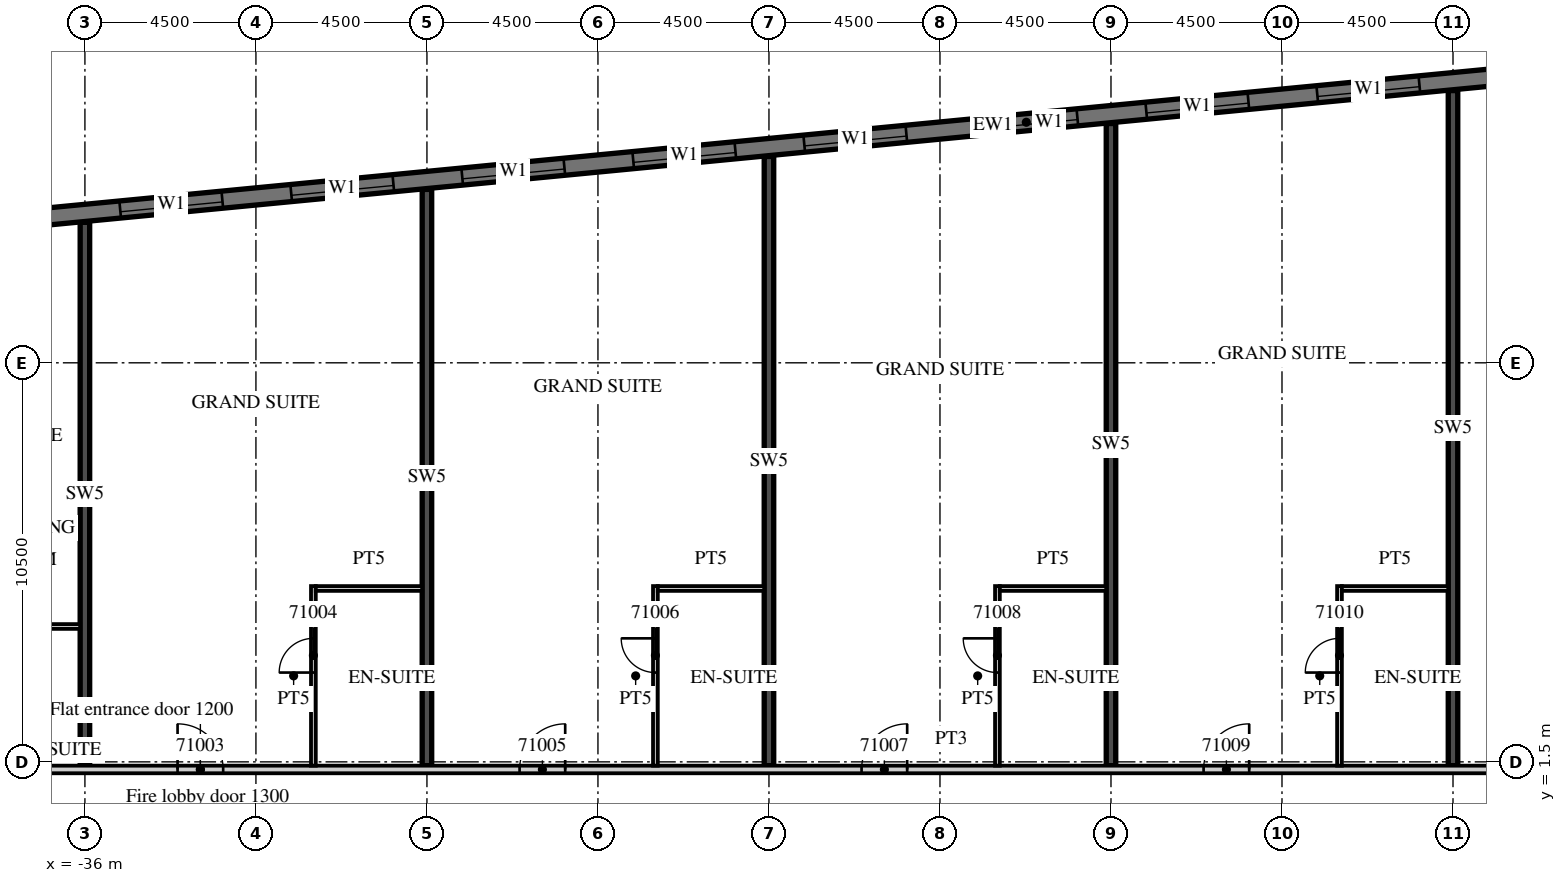
"""IFC4 building model, lengths in metres.
Left out: names, types, materials, properties, quantities, classifications, styles, units other than length and angle.
Written with IfcOpenShell. Run it as: python <this file> out.ifc"""

import sys

from ifc_helpers import new_model, si_unit, direction, frame, frame_2d, origin, place, context, subcontext, project, spatial, rectangle, extrude, element, fill, save


model = new_model("IFC4")
c1 = context("Model", 3, precision=1e-05, world=origin(), true_north=direction((0.0, 1.0)))
c2 = subcontext(c1, "Body", "Model", "MODEL_VIEW")
j1 = project(units=[si_unit("LENGTHUNIT", "METRE"), si_unit("PLANEANGLEUNIT", "RADIAN")], contexts=[c1])
p1 = place(None, origin())
s1 = spatial("IfcSite", under=j1, at=p1, CompositionType="ELEMENT")
p2 = place(p1, origin())
s2 = spatial("IfcBuilding", under=s1, at=p2, CompositionType="ELEMENT")
p3 = place(p2, frame((0.0, 0.0, 285.0)))
s3 = spatial("IfcBuildingStorey", under=s2, at=p3, CompositionType="ELEMENT", Elevation=285.0)
p4 = place(p3, frame((-36.0, 1.4, 0.0), z_axis=(0.0, 0.0, 1.0), x_axis=(0.0, 1.0, 0.0)))
e1 = element("IfcWall", 1, at=p4, inside=s3, PredefinedType="SHEAR", context=c2, shape_type="SweptSolid", body=[
    extrude(rectangle(XDim=14.296, YDim=0.25, at=frame_2d((7.148, 0.0))), origin(), (0.0, 0.0, 1.0), 3.3),
])
p5 = place(p3, frame((-27.0, 1.4, 0.0), z_axis=(0.0, 0.0, 1.0), x_axis=(0.0, 1.0, 0.0)))
e2 = element("IfcWall", 2, at=p5, inside=s3, PredefinedType="SHEAR", context=c2, shape_type="SweptSolid", body=[
    extrude(rectangle(XDim=15.163, YDim=0.25, at=frame_2d((7.582, 0.0))), origin(), (0.0, 0.0, 1.0), 3.3),
])
p6 = place(p3, frame((-18.0, 1.4, 0.0), z_axis=(0.0, 0.0, 1.0), x_axis=(0.0, 1.0, 0.0)))
e3 = element("IfcWall", 3, at=p6, inside=s3, PredefinedType="SHEAR", context=c2, shape_type="SweptSolid", body=[
    extrude(rectangle(XDim=16.03, YDim=0.25, at=frame_2d((8.015, 0.0))), origin(), (0.0, 0.0, 1.0), 3.3),
])
p7 = place(p3, frame((-9.0, 1.4, 0.0), z_axis=(0.0, 0.0, 1.0), x_axis=(0.0, 1.0, 0.0)))
e4 = element("IfcWall", 4, at=p7, inside=s3, PredefinedType="SHEAR", context=c2, shape_type="SweptSolid", body=[
    extrude(rectangle(XDim=16.896, YDim=0.25, at=frame_2d((8.448, 0.0))), origin(), (0.0, 0.0, 1.0), 3.3),
])
p8 = place(p3, frame((0.0, 1.4, 0.0), z_axis=(0.0, 0.0, 1.0), x_axis=(0.0, 1.0, 0.0)))
e5 = element("IfcWall", 5, at=p8, inside=s3, PredefinedType="SHEAR", context=c2, shape_type="SweptSolid", body=[
    extrude(rectangle(XDim=17.763, YDim=0.25, at=frame_2d((8.881, 0.0))), origin(), (0.0, 0.0, 1.0), 3.3),
])
p9 = place(p3, frame((13.521, 20.713, 0.0), z_axis=(0.0, 0.0, 1.0), x_axis=(-0.995396277313, -0.095844932638, 0.0)))
e6 = element("IfcWall", 6, at=p9, inside=s3, PredefinedType="SOLIDWALL", context=c2, shape_type="SweptSolid", body=[
    extrude(rectangle(XDim=51.495, YDim=0.45, at=frame_2d((25.748, 0.0))), origin(), (0.0, 0.0, 1.0), 3.02),
])
p10 = place(p9, frame((0.91, 0.0, 0.45)))
e7 = element("IfcOpeningElement", 7, at=p10, cuts=e6, PredefinedType="OPENING", context=c2, shape_type="SweptSolid", body=[
    extrude(rectangle(XDim=2.7, YDim=2.25, at=frame_2d((1.35, 1.125))), frame((0.0, 0.235, 0.0), z_axis=(0.0, -1.0, 0.0), x_axis=(1.0, 0.0, 0.0)), (0.0, 0.0, 1.0), 0.47),
])
p11 = place(p9, frame((5.431, 0.0, 0.45)))
e8 = element("IfcOpeningElement", 8, at=p11, cuts=e6, PredefinedType="OPENING", context=c2, shape_type="SweptSolid", body=[
    extrude(rectangle(XDim=2.7, YDim=2.25, at=frame_2d((1.35, 1.125))), frame((0.0, 0.235, 0.0), z_axis=(0.0, -1.0, 0.0), x_axis=(1.0, 0.0, 0.0)), (0.0, 0.0, 1.0), 0.47),
])
p12 = place(p9, frame((9.952, 0.0, 0.45)))
e9 = element("IfcOpeningElement", 9, at=p12, cuts=e6, PredefinedType="OPENING", context=c2, shape_type="SweptSolid", body=[
    extrude(rectangle(XDim=2.7, YDim=2.25, at=frame_2d((1.35, 1.125))), frame((0.0, 0.235, 0.0), z_axis=(0.0, -1.0, 0.0), x_axis=(1.0, 0.0, 0.0)), (0.0, 0.0, 1.0), 0.47),
])
p13 = place(p9, frame((14.473, 0.0, 0.45)))
e10 = element("IfcOpeningElement", 10, at=p13, cuts=e6, PredefinedType="OPENING", context=c2, shape_type="SweptSolid", body=[
    extrude(rectangle(XDim=2.7, YDim=2.25, at=frame_2d((1.35, 1.125))), frame((0.0, 0.235, 0.0), z_axis=(0.0, -1.0, 0.0), x_axis=(1.0, 0.0, 0.0)), (0.0, 0.0, 1.0), 0.47),
])
p14 = place(p9, frame((18.994, 0.0, 0.45)))
e11 = element("IfcOpeningElement", 11, at=p14, cuts=e6, PredefinedType="OPENING", context=c2, shape_type="SweptSolid", body=[
    extrude(rectangle(XDim=2.7, YDim=2.25, at=frame_2d((1.35, 1.125))), frame((0.0, 0.235, 0.0), z_axis=(0.0, -1.0, 0.0), x_axis=(1.0, 0.0, 0.0)), (0.0, 0.0, 1.0), 0.47),
])
p15 = place(p9, frame((23.514, 0.0, 0.45)))
e12 = element("IfcOpeningElement", 12, at=p15, cuts=e6, PredefinedType="OPENING", context=c2, shape_type="SweptSolid", body=[
    extrude(rectangle(XDim=2.7, YDim=2.25, at=frame_2d((1.35, 1.125))), frame((0.0, 0.235, 0.0), z_axis=(0.0, -1.0, 0.0), x_axis=(1.0, 0.0, 0.0)), (0.0, 0.0, 1.0), 0.47),
])
p16 = place(p9, frame((28.035, 0.0, 0.45)))
e13 = element("IfcOpeningElement", 13, at=p16, cuts=e6, PredefinedType="OPENING", context=c2, shape_type="SweptSolid", body=[
    extrude(rectangle(XDim=2.7, YDim=2.25, at=frame_2d((1.35, 1.125))), frame((0.0, 0.235, 0.0), z_axis=(0.0, -1.0, 0.0), x_axis=(1.0, 0.0, 0.0)), (0.0, 0.0, 1.0), 0.47),
])
p17 = place(p9, frame((32.556, 0.0, 0.45)))
e14 = element("IfcOpeningElement", 14, at=p17, cuts=e6, PredefinedType="OPENING", context=c2, shape_type="SweptSolid", body=[
    extrude(rectangle(XDim=2.7, YDim=2.25, at=frame_2d((1.35, 1.125))), frame((0.0, 0.235, 0.0), z_axis=(0.0, -1.0, 0.0), x_axis=(1.0, 0.0, 0.0)), (0.0, 0.0, 1.0), 0.47),
])
p18 = place(p9, frame((37.077, 0.0, 0.45)))
e15 = element("IfcOpeningElement", 15, at=p18, cuts=e6, PredefinedType="OPENING", context=c2, shape_type="SweptSolid", body=[
    extrude(rectangle(XDim=2.7, YDim=2.25, at=frame_2d((1.35, 1.125))), frame((0.0, 0.235, 0.0), z_axis=(0.0, -1.0, 0.0), x_axis=(1.0, 0.0, 0.0)), (0.0, 0.0, 1.0), 0.47),
])
p19 = place(p9, frame((41.598, 0.0, 0.45)))
e16 = element("IfcOpeningElement", 16, at=p19, cuts=e6, PredefinedType="OPENING", context=c2, shape_type="SweptSolid", body=[
    extrude(rectangle(XDim=2.7, YDim=2.25, at=frame_2d((1.35, 1.125))), frame((0.0, 0.235, 0.0), z_axis=(0.0, -1.0, 0.0), x_axis=(1.0, 0.0, 0.0)), (0.0, 0.0, 1.0), 0.47),
])
p20 = place(p9, frame((46.118, 0.0, 0.45)))
e17 = element("IfcOpeningElement", 17, at=p20, cuts=e6, PredefinedType="OPENING", context=c2, shape_type="SweptSolid", body=[
    extrude(rectangle(XDim=2.7, YDim=2.25, at=frame_2d((1.35, 1.125))), frame((0.0, 0.235, 0.0), z_axis=(0.0, -1.0, 0.0), x_axis=(1.0, 0.0, 0.0)), (0.0, 0.0, 1.0), 0.47),
])
p21 = place(p3, frame((-39.909, 1.3, 0.0), z_axis=(0.0, 0.0, 1.0), x_axis=(1.0, 0.0, 0.0)))
e18 = element("IfcWall", 18, at=p21, inside=s3, PredefinedType="PARTITIONING", context=c2, shape_type="SweptSolid", body=[
    extrude(rectangle(XDim=53.409, YDim=0.2, at=frame_2d((26.705, 0.0))), origin(), (0.0, 0.0, 1.0), 3.02),
])
p22 = place(p21, frame((0.15, 0.0, 0.0)))
e19 = element("IfcOpeningElement", 19, at=p22, cuts=e18, PredefinedType="OPENING", context=c2, shape_type="SweptSolid", body=[
    extrude(rectangle(XDim=0.9, YDim=2.1, at=frame_2d((0.45, 1.05))), frame((0.0, 0.11, 0.0), z_axis=(0.0, -1.0, 0.0), x_axis=(1.0, 0.0, 0.0)), (0.0, 0.0, 1.0), 0.22),
])
p23 = place(p21, frame((6.347, 0.0, 0.0)))
e20 = element("IfcOpeningElement", 20, at=p23, cuts=e18, PredefinedType="OPENING", context=c2, shape_type="SweptSolid", body=[
    extrude(rectangle(XDim=1.2, YDim=2.1, at=frame_2d((0.6, 1.05))), frame((0.0, 0.11, 0.0), z_axis=(0.0, -1.0, 0.0), x_axis=(1.0, 0.0, 0.0)), (0.0, 0.0, 1.0), 0.22),
])
p24 = place(p21, frame((15.347, 0.0, 0.0)))
e21 = element("IfcOpeningElement", 21, at=p24, cuts=e18, PredefinedType="OPENING", context=c2, shape_type="SweptSolid", body=[
    extrude(rectangle(XDim=1.2, YDim=2.1, at=frame_2d((0.6, 1.05))), frame((0.0, 0.11, 0.0), z_axis=(0.0, -1.0, 0.0), x_axis=(1.0, 0.0, 0.0)), (0.0, 0.0, 1.0), 0.22),
])
p25 = place(p21, frame((24.346, 0.0, 0.0)))
e22 = element("IfcOpeningElement", 22, at=p25, cuts=e18, PredefinedType="OPENING", context=c2, shape_type="SweptSolid", body=[
    extrude(rectangle(XDim=1.2, YDim=2.1, at=frame_2d((0.6, 1.05))), frame((0.0, 0.11, 0.0), z_axis=(0.0, -1.0, 0.0), x_axis=(1.0, 0.0, 0.0)), (0.0, 0.0, 1.0), 0.22),
])
p26 = place(p21, frame((33.346, 0.0, 0.0)))
e23 = element("IfcOpeningElement", 23, at=p26, cuts=e18, PredefinedType="OPENING", context=c2, shape_type="SweptSolid", body=[
    extrude(rectangle(XDim=1.2, YDim=2.1, at=frame_2d((0.6, 1.05))), frame((0.0, 0.11, 0.0), z_axis=(0.0, -1.0, 0.0), x_axis=(1.0, 0.0, 0.0)), (0.0, 0.0, 1.0), 0.22),
])
p27 = place(p21, frame((42.346, 0.0, 0.0)))
e24 = element("IfcOpeningElement", 24, at=p27, cuts=e18, PredefinedType="OPENING", context=c2, shape_type="SweptSolid", body=[
    extrude(rectangle(XDim=1.2, YDim=2.1, at=frame_2d((0.6, 1.05))), frame((0.0, 0.11, 0.0), z_axis=(0.0, -1.0, 0.0), x_axis=(1.0, 0.0, 0.0)), (0.0, 0.0, 1.0), 0.22),
])
p28 = place(p21, frame((51.834, 0.0, 0.0)))
e25 = element("IfcOpeningElement", 25, at=p28, cuts=e18, PredefinedType="OPENING", context=c2, shape_type="SweptSolid", body=[
    extrude(rectangle(XDim=1.0, YDim=2.1, at=frame_2d((0.5, 1.05))), frame((0.0, 0.11, 0.0), z_axis=(0.0, -1.0, 0.0), x_axis=(1.0, 0.0, 0.0)), (0.0, 0.0, 1.0), 0.22),
])
p29 = place(p3, frame((-38.878, 5.062, 0.0), z_axis=(0.0, 0.0, 1.0), x_axis=(1.0, 0.0, 0.0)))
e26 = element("IfcWall", 26, at=p29, inside=s3, PredefinedType="PARTITIONING", context=c2, shape_type="SweptSolid", body=[
    extrude(rectangle(XDim=2.753, YDim=0.125, at=frame_2d((1.376, 0.0))), origin(), (0.0, 0.0, 1.0), 3.02),
])
p30 = place(p3, frame((-29.988, 1.4, 0.0), z_axis=(0.0, 0.0, 1.0), x_axis=(0.0, 1.0, 0.0)))
e27 = element("IfcWall", 27, at=p30, inside=s3, PredefinedType="PARTITIONING", context=c2, shape_type="SweptSolid", body=[
    extrude(rectangle(XDim=4.725, YDim=0.125, at=frame_2d((2.363, 0.0))), origin(), (0.0, 0.0, 1.0), 3.02),
])
p31 = place(p30, frame((2.45, 0.0, 0.0)))
e28 = element("IfcOpeningElement", 28, at=p31, cuts=e27, PredefinedType="OPENING", context=c2, shape_type="SweptSolid", body=[
    extrude(rectangle(XDim=0.9, YDim=2.1, at=frame_2d((0.45, 1.05))), frame((0.0, 0.073, 0.0), z_axis=(0.0, -1.0, 0.0), x_axis=(1.0, 0.0, 0.0)), (0.0, 0.0, 1.0), 0.145),
])
p32 = place(p3, frame((-29.925, 6.062, 0.0), z_axis=(0.0, 0.0, 1.0), x_axis=(1.0, 0.0, 0.0)))
e29 = element("IfcWall", 29, at=p32, inside=s3, PredefinedType="PARTITIONING", context=c2, shape_type="SweptSolid", body=[
    extrude(rectangle(XDim=2.8, YDim=0.125, at=frame_2d((1.4, 0.0))), origin(), (0.0, 0.0, 1.0), 3.02),
])
p33 = place(p3, frame((-20.988, 1.4, 0.0), z_axis=(0.0, 0.0, 1.0), x_axis=(0.0, 1.0, 0.0)))
e30 = element("IfcWall", 30, at=p33, inside=s3, PredefinedType="PARTITIONING", context=c2, shape_type="SweptSolid", body=[
    extrude(rectangle(XDim=4.725, YDim=0.125, at=frame_2d((2.363, 0.0))), origin(), (0.0, 0.0, 1.0), 3.02),
])
p34 = place(p33, frame((2.45, 0.0, 0.0)))
e31 = element("IfcOpeningElement", 31, at=p34, cuts=e30, PredefinedType="OPENING", context=c2, shape_type="SweptSolid", body=[
    extrude(rectangle(XDim=0.9, YDim=2.1, at=frame_2d((0.45, 1.05))), frame((0.0, 0.073, 0.0), z_axis=(0.0, -1.0, 0.0), x_axis=(1.0, 0.0, 0.0)), (0.0, 0.0, 1.0), 0.145),
])
p35 = place(p3, frame((-20.925, 6.062, 0.0), z_axis=(0.0, 0.0, 1.0), x_axis=(1.0, 0.0, 0.0)))
e32 = element("IfcWall", 32, at=p35, inside=s3, PredefinedType="PARTITIONING", context=c2, shape_type="SweptSolid", body=[
    extrude(rectangle(XDim=2.8, YDim=0.125, at=frame_2d((1.4, 0.0))), origin(), (0.0, 0.0, 1.0), 3.02),
])
p36 = place(p3, frame((-11.988, 1.4, 0.0), z_axis=(0.0, 0.0, 1.0), x_axis=(0.0, 1.0, 0.0)))
e33 = element("IfcWall", 33, at=p36, inside=s3, PredefinedType="PARTITIONING", context=c2, shape_type="SweptSolid", body=[
    extrude(rectangle(XDim=4.725, YDim=0.125, at=frame_2d((2.363, 0.0))), origin(), (0.0, 0.0, 1.0), 3.02),
])
p37 = place(p36, frame((2.45, 0.0, 0.0)))
e34 = element("IfcOpeningElement", 34, at=p37, cuts=e33, PredefinedType="OPENING", context=c2, shape_type="SweptSolid", body=[
    extrude(rectangle(XDim=0.9, YDim=2.1, at=frame_2d((0.45, 1.05))), frame((0.0, 0.073, 0.0), z_axis=(0.0, -1.0, 0.0), x_axis=(1.0, 0.0, 0.0)), (0.0, 0.0, 1.0), 0.145),
])
p38 = place(p3, frame((-11.925, 6.062, 0.0), z_axis=(0.0, 0.0, 1.0), x_axis=(1.0, 0.0, 0.0)))
e35 = element("IfcWall", 35, at=p38, inside=s3, PredefinedType="PARTITIONING", context=c2, shape_type="SweptSolid", body=[
    extrude(rectangle(XDim=2.8, YDim=0.125, at=frame_2d((1.4, 0.0))), origin(), (0.0, 0.0, 1.0), 3.02),
])
p39 = place(p3, frame((-2.987, 1.4, 0.0), z_axis=(0.0, 0.0, 1.0), x_axis=(0.0, 1.0, 0.0)))
e36 = element("IfcWall", 36, at=p39, inside=s3, PredefinedType="PARTITIONING", context=c2, shape_type="SweptSolid", body=[
    extrude(rectangle(XDim=4.725, YDim=0.125, at=frame_2d((2.363, 0.0))), origin(), (0.0, 0.0, 1.0), 3.02),
])
p40 = place(p39, frame((2.45, 0.0, 0.0)))
e37 = element("IfcOpeningElement", 37, at=p40, cuts=e36, PredefinedType="OPENING", context=c2, shape_type="SweptSolid", body=[
    extrude(rectangle(XDim=0.9, YDim=2.1, at=frame_2d((0.45, 1.05))), frame((0.0, 0.073, 0.0), z_axis=(0.0, -1.0, 0.0), x_axis=(1.0, 0.0, 0.0)), (0.0, 0.0, 1.0), 0.145),
])
p41 = place(p3, frame((-2.925, 6.062, 0.0), z_axis=(0.0, 0.0, 1.0), x_axis=(1.0, 0.0, 0.0)))
e38 = element("IfcWall", 38, at=p41, inside=s3, PredefinedType="PARTITIONING", context=c2, shape_type="SweptSolid", body=[
    extrude(rectangle(XDim=2.8, YDim=0.125, at=frame_2d((1.4, 0.0))), origin(), (0.0, 0.0, 1.0), 3.02),
])
p42 = place(p13, origin())
e39 = element("IfcWindow", 39, at=p42, inside=s3, PartitioningType="SINGLE_PANEL", PredefinedType="WINDOW", context=c2, shape_type="SweptSolid", body=[
    extrude(rectangle(XDim=2.7, YDim=2.25, at=frame_2d((1.35, 1.125))), frame((0.0, 0.09, 0.0), z_axis=(0.0, -1.0, 0.0), x_axis=(1.0, 0.0, 0.0)), (0.0, 0.0, 1.0), 0.06),
])
fill(e10, e39)
p43 = place(p14, origin())
e40 = element("IfcWindow", 40, at=p43, inside=s3, PartitioningType="SINGLE_PANEL", PredefinedType="WINDOW", context=c2, shape_type="SweptSolid", body=[
    extrude(rectangle(XDim=2.7, YDim=2.25, at=frame_2d((1.35, 1.125))), frame((0.0, 0.09, 0.0), z_axis=(0.0, -1.0, 0.0), x_axis=(1.0, 0.0, 0.0)), (0.0, 0.0, 1.0), 0.06),
])
fill(e11, e40)
p44 = place(p15, origin())
e41 = element("IfcWindow", 41, at=p44, inside=s3, PartitioningType="SINGLE_PANEL", PredefinedType="WINDOW", context=c2, shape_type="SweptSolid", body=[
    extrude(rectangle(XDim=2.7, YDim=2.25, at=frame_2d((1.35, 1.125))), frame((0.0, 0.09, 0.0), z_axis=(0.0, -1.0, 0.0), x_axis=(1.0, 0.0, 0.0)), (0.0, 0.0, 1.0), 0.06),
])
fill(e12, e41)
p45 = place(p16, origin())
e42 = element("IfcWindow", 42, at=p45, inside=s3, PartitioningType="SINGLE_PANEL", PredefinedType="WINDOW", context=c2, shape_type="SweptSolid", body=[
    extrude(rectangle(XDim=2.7, YDim=2.25, at=frame_2d((1.35, 1.125))), frame((0.0, 0.09, 0.0), z_axis=(0.0, -1.0, 0.0), x_axis=(1.0, 0.0, 0.0)), (0.0, 0.0, 1.0), 0.06),
])
fill(e13, e42)
p46 = place(p17, origin())
e43 = element("IfcWindow", 43, at=p46, inside=s3, PartitioningType="SINGLE_PANEL", PredefinedType="WINDOW", context=c2, shape_type="SweptSolid", body=[
    extrude(rectangle(XDim=2.7, YDim=2.25, at=frame_2d((1.35, 1.125))), frame((0.0, 0.09, 0.0), z_axis=(0.0, -1.0, 0.0), x_axis=(1.0, 0.0, 0.0)), (0.0, 0.0, 1.0), 0.06),
])
fill(e14, e43)
p47 = place(p18, origin())
e44 = element("IfcWindow", 44, at=p47, inside=s3, PartitioningType="SINGLE_PANEL", PredefinedType="WINDOW", context=c2, shape_type="SweptSolid", body=[
    extrude(rectangle(XDim=2.7, YDim=2.25, at=frame_2d((1.35, 1.125))), frame((0.0, 0.09, 0.0), z_axis=(0.0, -1.0, 0.0), x_axis=(1.0, 0.0, 0.0)), (0.0, 0.0, 1.0), 0.06),
])
fill(e15, e44)
p48 = place(p19, origin())
e45 = element("IfcWindow", 45, at=p48, inside=s3, PartitioningType="SINGLE_PANEL", PredefinedType="WINDOW", context=c2, shape_type="SweptSolid", body=[
    extrude(rectangle(XDim=2.7, YDim=2.25, at=frame_2d((1.35, 1.125))), frame((0.0, 0.09, 0.0), z_axis=(0.0, -1.0, 0.0), x_axis=(1.0, 0.0, 0.0)), (0.0, 0.0, 1.0), 0.06),
])
fill(e16, e45)
p49 = place(p20, origin())
e46 = element("IfcWindow", 46, at=p49, inside=s3, PartitioningType="SINGLE_PANEL", PredefinedType="WINDOW", context=c2, shape_type="SweptSolid", body=[
    extrude(rectangle(XDim=2.7, YDim=2.25, at=frame_2d((1.35, 1.125))), frame((0.0, 0.09, 0.0), z_axis=(0.0, -1.0, 0.0), x_axis=(1.0, 0.0, 0.0)), (0.0, 0.0, 1.0), 0.06),
])
fill(e17, e46)
p50 = place(p23, origin())
e47 = element("IfcDoor", 47, at=p50, inside=s3, OperationType="SINGLE_SWING_LEFT", PredefinedType="DOOR", context=c2, shape_type="SweptSolid", body=[
    extrude(rectangle(XDim=1.2, YDim=2.1, at=frame_2d((0.6, 1.05))), frame((0.0, 0.025, 0.0), z_axis=(0.0, -1.0, 0.0), x_axis=(1.0, 0.0, 0.0)), (0.0, 0.0, 1.0), 0.05),
])
fill(e20, e47)
p51 = place(p31, origin())
e48 = element("IfcDoor", 48, at=p51, inside=s3, OperationType="SINGLE_SWING_LEFT", PredefinedType="DOOR", context=c2, shape_type="SweptSolid", body=[
    extrude(rectangle(XDim=0.9, YDim=2.1, at=frame_2d((0.45, 1.05))), frame((0.0, 0.025, 0.0), z_axis=(0.0, -1.0, 0.0), x_axis=(1.0, 0.0, 0.0)), (0.0, 0.0, 1.0), 0.05),
])
fill(e28, e48)
p52 = place(p24, origin())
e49 = element("IfcDoor", 49, at=p52, inside=s3, OperationType="SINGLE_SWING_RIGHT", PredefinedType="DOOR", context=c2, shape_type="SweptSolid", body=[
    extrude(rectangle(XDim=1.2, YDim=2.1, at=frame_2d((0.6, 1.05))), frame((0.0, 0.025, 0.0), z_axis=(0.0, -1.0, 0.0), x_axis=(1.0, 0.0, 0.0)), (0.0, 0.0, 1.0), 0.05),
])
fill(e21, e49)
p53 = place(p34, origin())
e50 = element("IfcDoor", 50, at=p53, inside=s3, OperationType="SINGLE_SWING_RIGHT", PredefinedType="DOOR", context=c2, shape_type="SweptSolid", body=[
    extrude(rectangle(XDim=0.9, YDim=2.1, at=frame_2d((0.45, 1.05))), frame((0.0, 0.025, 0.0), z_axis=(0.0, -1.0, 0.0), x_axis=(1.0, 0.0, 0.0)), (0.0, 0.0, 1.0), 0.05),
])
fill(e31, e50)
p54 = place(p25, origin())
e51 = element("IfcDoor", 51, at=p54, inside=s3, OperationType="SINGLE_SWING_RIGHT", PredefinedType="DOOR", context=c2, shape_type="SweptSolid", body=[
    extrude(rectangle(XDim=1.2, YDim=2.1, at=frame_2d((0.6, 1.05))), frame((0.0, 0.025, 0.0), z_axis=(0.0, -1.0, 0.0), x_axis=(1.0, 0.0, 0.0)), (0.0, 0.0, 1.0), 0.05),
])
fill(e22, e51)
p55 = place(p37, origin())
e52 = element("IfcDoor", 52, at=p55, inside=s3, OperationType="SINGLE_SWING_RIGHT", PredefinedType="DOOR", context=c2, shape_type="SweptSolid", body=[
    extrude(rectangle(XDim=0.9, YDim=2.1, at=frame_2d((0.45, 1.05))), frame((0.0, 0.025, 0.0), z_axis=(0.0, -1.0, 0.0), x_axis=(1.0, 0.0, 0.0)), (0.0, 0.0, 1.0), 0.05),
])
fill(e34, e52)
p56 = place(p26, origin())
e53 = element("IfcDoor", 53, at=p56, inside=s3, OperationType="SINGLE_SWING_RIGHT", PredefinedType="DOOR", context=c2, shape_type="SweptSolid", body=[
    extrude(rectangle(XDim=1.2, YDim=2.1, at=frame_2d((0.6, 1.05))), frame((0.0, 0.025, 0.0), z_axis=(0.0, -1.0, 0.0), x_axis=(1.0, 0.0, 0.0)), (0.0, 0.0, 1.0), 0.05),
])
fill(e23, e53)
p57 = place(p40, origin())
e54 = element("IfcDoor", 54, at=p57, inside=s3, OperationType="SINGLE_SWING_LEFT", PredefinedType="DOOR", context=c2, shape_type="SweptSolid", body=[
    extrude(rectangle(XDim=0.9, YDim=2.1, at=frame_2d((0.45, 1.05))), frame((0.0, 0.025, 0.0), z_axis=(0.0, -1.0, 0.0), x_axis=(1.0, 0.0, 0.0)), (0.0, 0.0, 1.0), 0.05),
])
fill(e37, e54)
save(model, sys.argv[1])
